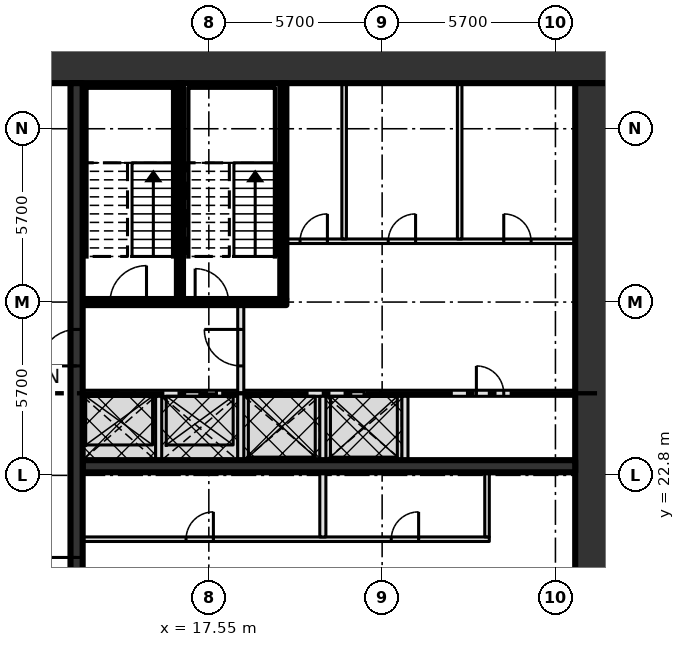
"""IFC4 building model, lengths in metres.
Left out: names, types, materials, properties, quantities, classifications, styles, units other than length and angle.
Written with IfcOpenShell. Run it as: python <this file> out.ifc"""

import sys

from ifc_helpers import new_model, si_unit, direction, frame, frame_2d, origin, place, context, subcontext, project, spatial, rectangle, extrude, element, fill, save


model = new_model("IFC4")
c1 = context("Model", 3, precision=1e-05, world=origin(), true_north=direction((0.0, 1.0)))
c2 = subcontext(c1, "Body", "Model", "MODEL_VIEW")
j1 = project(units=[si_unit("LENGTHUNIT", "METRE"), si_unit("PLANEANGLEUNIT", "RADIAN")], contexts=[c1])
p1 = place(None, origin())
s1 = spatial("IfcSite", under=j1, at=p1, CompositionType="ELEMENT")
p2 = place(p1, origin())
s2 = spatial("IfcBuilding", under=s1, at=p2, CompositionType="ELEMENT")
p3 = place(p2, frame((0.0, 0.0, -9.0)))
s3 = spatial("IfcBuildingStorey", under=s2, at=p3, CompositionType="ELEMENT", Elevation=-9.0)
p4 = place(p3, frame((8.0, 36.3, 0.0), z_axis=(0.0, 0.0, 1.0), x_axis=(1.0, 0.0, 0.0)))
e1 = element("IfcWall", 1, at=p4, inside=s3, PredefinedType="SHEAR", context=c2, shape_type="SweptSolid", body=[
    extrude(rectangle(XDim=22.8, YDim=1.2, at=frame_2d((11.4, 0.0))), origin(), (0.0, 0.0, 1.0), 4.05),
])
p5 = place(p4, frame((2.3, 0.0, 0.0)))
e2 = element("IfcOpeningElement", 2, at=p5, cuts=e1, PredefinedType="OPENING", context=c2, shape_type="SweptSolid", body=[
    extrude(rectangle(XDim=1.8, YDim=2.1, at=frame_2d((0.9, 1.05))), frame((0.0, 0.61, 0.0), z_axis=(0.0, -1.0, 0.0), x_axis=(1.0, 0.0, 0.0)), (0.0, 0.0, 1.0), 1.22),
])
p6 = place(p3, frame((30.2, 15.3, 0.0), z_axis=(0.0, 0.0, 1.0), x_axis=(0.0, 1.0, 0.0)))
e3 = element("IfcWall", 3, at=p6, inside=s3, PredefinedType="SHEAR", context=c2, shape_type="SweptSolid", body=[
    extrude(rectangle(XDim=20.4, YDim=1.2, at=frame_2d((10.2, 0.0))), origin(), (0.0, 0.0, 1.0), 4.05),
])
p7 = place(p3, frame((13.4, 20.7, 0.0), z_axis=(0.0, 0.0, 1.0), x_axis=(1.0, 0.0, 0.0)))
e4 = element("IfcWall", 4, at=p7, inside=s3, PredefinedType="PARTITIONING", context=c2, shape_type="SweptSolid", body=[
    extrude(rectangle(XDim=13.375, YDim=0.15, at=frame_2d((6.688, 0.0))), origin(), (0.0, 0.0, 1.0), 4.05),
])
p8 = place(p7, frame((3.4, 0.0, 0.0)))
e5 = element("IfcOpeningElement", 5, at=p8, cuts=e4, PredefinedType="OPENING", context=c2, shape_type="SweptSolid", body=[
    extrude(rectangle(XDim=0.9, YDim=2.1, at=frame_2d((0.45, 1.05))), frame((0.0, 0.085, 0.0), z_axis=(0.0, -1.0, 0.0), x_axis=(1.0, 0.0, 0.0)), (0.0, 0.0, 1.0), 0.17),
])
p9 = place(p7, frame((10.15, 0.0, 0.0)))
e6 = element("IfcOpeningElement", 6, at=p9, cuts=e4, PredefinedType="OPENING", context=c2, shape_type="SweptSolid", body=[
    extrude(rectangle(XDim=0.9, YDim=2.1, at=frame_2d((0.45, 1.05))), frame((0.0, 0.085, 0.0), z_axis=(0.0, -1.0, 0.0), x_axis=(1.0, 0.0, 0.0)), (0.0, 0.0, 1.0), 0.17),
])
p10 = place(p3, frame((13.4, 23.1, 0.0), z_axis=(0.0, 0.0, 1.0), x_axis=(1.0, 0.0, 0.0)))
e7 = element("IfcWall", 7, at=p10, inside=s3, PredefinedType="SHEAR", context=c2, shape_type="SweptSolid", body=[
    extrude(rectangle(XDim=16.2, YDim=0.4, at=frame_2d((8.1, 0.0))), origin(), (0.0, 0.0, 1.0), 4.05),
])
p11 = place(p3, frame((13.4, 25.5, 0.0), z_axis=(0.0, 0.0, 1.0), x_axis=(1.0, 0.0, 0.0)))
e8 = element("IfcWall", 8, at=p11, inside=s3, PredefinedType="SOLIDWALL", context=c2, shape_type="SweptSolid", body=[
    extrude(rectangle(XDim=16.2, YDim=0.2, at=frame_2d((8.1, 0.0))), origin(), (0.0, 0.0, 1.0), 4.05),
])
p12 = place(p11, frame((0.6, 0.0, 0.0)))
e9 = element("IfcOpeningElement", 9, at=p12, cuts=e8, PredefinedType="OPENING", context=c2, shape_type="SweptSolid", body=[
    extrude(rectangle(XDim=1.1, YDim=2.1, at=frame_2d((0.55, 1.05))), frame((0.0, 0.11, 0.0), z_axis=(0.0, -1.0, 0.0), x_axis=(1.0, 0.0, 0.0)), (0.0, 0.0, 1.0), 0.22),
])
p13 = place(p11, frame((3.3, 0.0, 0.0)))
e10 = element("IfcOpeningElement", 10, at=p13, cuts=e8, PredefinedType="OPENING", context=c2, shape_type="SweptSolid", body=[
    extrude(rectangle(XDim=1.1, YDim=2.1, at=frame_2d((0.55, 1.05))), frame((0.0, 0.11, 0.0), z_axis=(0.0, -1.0, 0.0), x_axis=(1.0, 0.0, 0.0)), (0.0, 0.0, 1.0), 0.22),
])
p14 = place(p11, frame((6.0, 0.0, 0.0)))
e11 = element("IfcOpeningElement", 11, at=p14, cuts=e8, PredefinedType="OPENING", context=c2, shape_type="SweptSolid", body=[
    extrude(rectangle(XDim=1.1, YDim=2.1, at=frame_2d((0.55, 1.05))), frame((0.0, 0.11, 0.0), z_axis=(0.0, -1.0, 0.0), x_axis=(1.0, 0.0, 0.0)), (0.0, 0.0, 1.0), 0.22),
])
p15 = place(p11, frame((8.7, 0.0, 0.0)))
e12 = element("IfcOpeningElement", 12, at=p15, cuts=e8, PredefinedType="OPENING", context=c2, shape_type="SweptSolid", body=[
    extrude(rectangle(XDim=1.1, YDim=2.1, at=frame_2d((0.55, 1.05))), frame((0.0, 0.11, 0.0), z_axis=(0.0, -1.0, 0.0), x_axis=(1.0, 0.0, 0.0)), (0.0, 0.0, 1.0), 0.22),
])
p16 = place(p11, frame((12.95, 0.0, 0.0)))
e13 = element("IfcOpeningElement", 13, at=p16, cuts=e8, PredefinedType="OPENING", context=c2, shape_type="SweptSolid", body=[
    extrude(rectangle(XDim=0.9, YDim=2.1, at=frame_2d((0.45, 1.05))), frame((0.0, 0.11, 0.0), z_axis=(0.0, -1.0, 0.0), x_axis=(1.0, 0.0, 0.0)), (0.0, 0.0, 1.0), 0.22),
])
p17 = place(p3, frame((13.4, 28.5, 0.0), z_axis=(0.0, 0.0, 1.0), x_axis=(1.0, 0.0, 0.0)))
e14 = element("IfcWall", 14, at=p17, inside=s3, PredefinedType="SOLIDWALL", context=c2, shape_type="SweptSolid", body=[
    extrude(rectangle(XDim=6.7, YDim=0.2, at=frame_2d((3.35, 0.0))), origin(), (0.0, 0.0, 1.0), 4.05),
])
p18 = place(p17, frame((0.9, 0.0, 0.0)))
e15 = element("IfcOpeningElement", 15, at=p18, cuts=e14, PredefinedType="OPENING", context=c2, shape_type="SweptSolid", body=[
    extrude(rectangle(XDim=1.2, YDim=2.1, at=frame_2d((0.6, 1.05))), frame((0.0, 0.11, 0.0), z_axis=(0.0, -1.0, 0.0), x_axis=(1.0, 0.0, 0.0)), (0.0, 0.0, 1.0), 0.22),
])
p19 = place(p17, frame((3.7, 0.0, 0.0)))
e16 = element("IfcOpeningElement", 16, at=p19, cuts=e14, PredefinedType="OPENING", context=c2, shape_type="SweptSolid", body=[
    extrude(rectangle(XDim=1.1, YDim=2.1, at=frame_2d((0.55, 1.05))), frame((0.0, 0.11, 0.0), z_axis=(0.0, -1.0, 0.0), x_axis=(1.0, 0.0, 0.0)), (0.0, 0.0, 1.0), 0.22),
])
p20 = place(p3, frame((20.1, 30.5, 0.0), z_axis=(0.0, 0.0, 1.0), x_axis=(1.0, 0.0, 0.0)))
e17 = element("IfcWall", 17, at=p20, inside=s3, PredefinedType="PARTITIONING", context=c2, shape_type="SweptSolid", body=[
    extrude(rectangle(XDim=9.5, YDim=0.15, at=frame_2d((4.75, 0.0))), origin(), (0.0, 0.0, 1.0), 4.05),
])
p21 = place(p20, frame((0.45, 0.0, 0.0)))
e18 = element("IfcOpeningElement", 18, at=p21, cuts=e17, PredefinedType="OPENING", context=c2, shape_type="SweptSolid", body=[
    extrude(rectangle(XDim=0.9, YDim=2.1, at=frame_2d((0.45, 1.05))), frame((0.0, 0.085, 0.0), z_axis=(0.0, -1.0, 0.0), x_axis=(1.0, 0.0, 0.0)), (0.0, 0.0, 1.0), 0.17),
])
p22 = place(p20, frame((3.35, 0.0, 0.0)))
e19 = element("IfcOpeningElement", 19, at=p22, cuts=e17, PredefinedType="OPENING", context=c2, shape_type="SweptSolid", body=[
    extrude(rectangle(XDim=0.9, YDim=2.1, at=frame_2d((0.45, 1.05))), frame((0.0, 0.085, 0.0), z_axis=(0.0, -1.0, 0.0), x_axis=(1.0, 0.0, 0.0)), (0.0, 0.0, 1.0), 0.17),
])
p23 = place(p20, frame((7.15, 0.0, 0.0)))
e20 = element("IfcOpeningElement", 20, at=p23, cuts=e17, PredefinedType="OPENING", context=c2, shape_type="SweptSolid", body=[
    extrude(rectangle(XDim=0.9, YDim=2.1, at=frame_2d((0.45, 1.05))), frame((0.0, 0.085, 0.0), z_axis=(0.0, -1.0, 0.0), x_axis=(1.0, 0.0, 0.0)), (0.0, 0.0, 1.0), 0.17),
])
p24 = place(p3, frame((13.2, 15.3, 0.0), z_axis=(0.0, 0.0, 1.0), x_axis=(0.0, 1.0, 0.0)))
e21 = element("IfcWall", 21, at=p24, inside=s3, PredefinedType="SHEAR", context=c2, shape_type="SweptSolid", body=[
    extrude(rectangle(XDim=20.4, YDim=0.4, at=frame_2d((10.2, 0.0))), origin(), (0.0, 0.0, 1.0), 4.05),
])
p25 = place(p24, frame((3.0, 0.0, 0.0)))
e22 = element("IfcOpeningElement", 22, at=p25, cuts=e21, PredefinedType="OPENING", context=c2, shape_type="SweptSolid", body=[
    extrude(rectangle(XDim=1.8, YDim=2.1, at=frame_2d((0.9, 1.05))), frame((0.0, 0.21, 0.0), z_axis=(0.0, -1.0, 0.0), x_axis=(1.0, 0.0, 0.0)), (0.0, 0.0, 1.0), 0.42),
])
p26 = place(p24, frame((11.1, 0.0, 0.0)))
e23 = element("IfcOpeningElement", 23, at=p26, cuts=e21, PredefinedType="OPENING", context=c2, shape_type="SweptSolid", body=[
    extrude(rectangle(XDim=1.2, YDim=2.1, at=frame_2d((0.6, 1.05))), frame((0.0, 0.21, 0.0), z_axis=(0.0, -1.0, 0.0), x_axis=(1.0, 0.0, 0.0)), (0.0, 0.0, 1.0), 0.42),
])
p27 = place(p3, frame((15.9, 23.3, 0.0), z_axis=(0.0, 0.0, 1.0), x_axis=(0.0, 1.0, 0.0)))
e24 = element("IfcWall", 24, at=p27, inside=s3, PredefinedType="SOLIDWALL", context=c2, shape_type="SweptSolid", body=[
    extrude(rectangle(XDim=2.1, YDim=0.2, at=frame_2d((1.05, 0.0))), origin(), (0.0, 0.0, 1.0), 4.05),
])
p28 = place(p3, frame((16.6, 28.6, 0.0), z_axis=(0.0, 0.0, 1.0), x_axis=(0.0, 1.0, 0.0)))
e25 = element("IfcWall", 25, at=p28, inside=s3, PredefinedType="SOLIDWALL", context=c2, shape_type="SweptSolid", body=[
    extrude(rectangle(XDim=7.1, YDim=0.2, at=frame_2d((3.55, 0.0))), origin(), (0.0, 0.0, 1.0), 4.05),
])
p29 = place(p3, frame((18.6, 23.3, 0.0), z_axis=(0.0, 0.0, 1.0), x_axis=(0.0, 1.0, 0.0)))
e26 = element("IfcWall", 26, at=p29, inside=s3, PredefinedType="SOLIDWALL", context=c2, shape_type="SweptSolid", body=[
    extrude(rectangle(XDim=5.1, YDim=0.2, at=frame_2d((2.55, 0.0))), origin(), (0.0, 0.0, 1.0), 4.05),
])
p30 = place(p29, frame((3.1, 0.0, 0.0)))
e27 = element("IfcOpeningElement", 27, at=p30, cuts=e26, PredefinedType="OPENING", context=c2, shape_type="SweptSolid", body=[
    extrude(rectangle(XDim=1.2, YDim=2.1, at=frame_2d((0.6, 1.05))), frame((0.0, 0.11, 0.0), z_axis=(0.0, -1.0, 0.0), x_axis=(1.0, 0.0, 0.0)), (0.0, 0.0, 1.0), 0.22),
])
p31 = place(p3, frame((20.0, 28.6, 0.0), z_axis=(0.0, 0.0, 1.0), x_axis=(0.0, 1.0, 0.0)))
e28 = element("IfcWall", 28, at=p31, inside=s3, PredefinedType="SOLIDWALL", context=c2, shape_type="SweptSolid", body=[
    extrude(rectangle(XDim=7.1, YDim=0.2, at=frame_2d((3.55, 0.0))), origin(), (0.0, 0.0, 1.0), 4.05),
])
p32 = place(p3, frame((21.3, 20.775, 0.0), z_axis=(0.0, 0.0, 1.0), x_axis=(0.0, 1.0, 0.0)))
e29 = element("IfcWall", 29, at=p32, inside=s3, PredefinedType="SOLIDWALL", context=c2, shape_type="SweptSolid", body=[
    extrude(rectangle(XDim=4.625, YDim=0.2, at=frame_2d((2.312, 0.0))), origin(), (0.0, 0.0, 1.0), 4.05),
])
p33 = place(p3, frame((22.0, 30.575, 0.0), z_axis=(0.0, 0.0, 1.0), x_axis=(0.0, 1.0, 0.0)))
e30 = element("IfcWall", 30, at=p33, inside=s3, PredefinedType="PARTITIONING", context=c2, shape_type="SweptSolid", body=[
    extrude(rectangle(XDim=5.125, YDim=0.15, at=frame_2d((2.562, 0.0))), origin(), (0.0, 0.0, 1.0), 4.05),
])
p34 = place(p3, frame((24.0, 23.3, 0.0), z_axis=(0.0, 0.0, 1.0), x_axis=(0.0, 1.0, 0.0)))
e31 = element("IfcWall", 31, at=p34, inside=s3, PredefinedType="SOLIDWALL", context=c2, shape_type="SweptSolid", body=[
    extrude(rectangle(XDim=2.1, YDim=0.2, at=frame_2d((1.05, 0.0))), origin(), (0.0, 0.0, 1.0), 4.05),
])
p35 = place(p3, frame((25.8, 30.575, 0.0), z_axis=(0.0, 0.0, 1.0), x_axis=(0.0, 1.0, 0.0)))
e32 = element("IfcWall", 32, at=p35, inside=s3, PredefinedType="PARTITIONING", context=c2, shape_type="SweptSolid", body=[
    extrude(rectangle(XDim=5.125, YDim=0.15, at=frame_2d((2.562, 0.0))), origin(), (0.0, 0.0, 1.0), 4.05),
])
p36 = place(p3, frame((26.7, 20.775, 0.0), z_axis=(0.0, 0.0, 1.0), x_axis=(0.0, 1.0, 0.0)))
e33 = element("IfcWall", 33, at=p36, inside=s3, PredefinedType="PARTITIONING", context=c2, shape_type="SweptSolid", body=[
    extrude(rectangle(XDim=2.125, YDim=0.15, at=frame_2d((1.062, 0.0))), origin(), (0.0, 0.0, 1.0), 4.05),
])
p37 = place(p12, origin())
e34 = element("IfcDoor", 34, at=p37, inside=s3, OperationType="SLIDING_TO_LEFT", PredefinedType="DOOR", context=c2, shape_type="SweptSolid", body=[
    extrude(rectangle(XDim=1.1, YDim=2.1, at=frame_2d((0.55, 1.05))), frame((0.0, 0.025, 0.0), z_axis=(0.0, -1.0, 0.0), x_axis=(1.0, 0.0, 0.0)), (0.0, 0.0, 1.0), 0.05),
])
fill(e9, e34)
p38 = place(p13, origin())
e35 = element("IfcDoor", 35, at=p38, inside=s3, OperationType="SLIDING_TO_LEFT", PredefinedType="DOOR", context=c2, shape_type="SweptSolid", body=[
    extrude(rectangle(XDim=1.1, YDim=2.1, at=frame_2d((0.55, 1.05))), frame((0.0, 0.025, 0.0), z_axis=(0.0, -1.0, 0.0), x_axis=(1.0, 0.0, 0.0)), (0.0, 0.0, 1.0), 0.05),
])
fill(e10, e35)
p39 = place(p14, origin())
e36 = element("IfcDoor", 36, at=p39, inside=s3, OperationType="SLIDING_TO_LEFT", PredefinedType="DOOR", context=c2, shape_type="SweptSolid", body=[
    extrude(rectangle(XDim=1.1, YDim=2.1, at=frame_2d((0.55, 1.05))), frame((0.0, 0.025, 0.0), z_axis=(0.0, -1.0, 0.0), x_axis=(1.0, 0.0, 0.0)), (0.0, 0.0, 1.0), 0.05),
])
fill(e11, e36)
p40 = place(p15, origin())
e37 = element("IfcDoor", 37, at=p40, inside=s3, OperationType="SLIDING_TO_LEFT", PredefinedType="DOOR", context=c2, shape_type="SweptSolid", body=[
    extrude(rectangle(XDim=1.1, YDim=2.1, at=frame_2d((0.55, 1.05))), frame((0.0, 0.025, 0.0), z_axis=(0.0, -1.0, 0.0), x_axis=(1.0, 0.0, 0.0)), (0.0, 0.0, 1.0), 0.05),
])
fill(e12, e37)
p41 = place(p8, origin())
e38 = element("IfcDoor", 38, at=p41, inside=s3, OperationType="SINGLE_SWING_RIGHT", PredefinedType="DOOR", context=c2, shape_type="SweptSolid", body=[
    extrude(rectangle(XDim=0.9, YDim=2.1, at=frame_2d((0.45, 1.05))), frame((0.0, 0.025, 0.0), z_axis=(0.0, -1.0, 0.0), x_axis=(1.0, 0.0, 0.0)), (0.0, 0.0, 1.0), 0.05),
])
fill(e5, e38)
p42 = place(p9, origin())
e39 = element("IfcDoor", 39, at=p42, inside=s3, OperationType="SINGLE_SWING_RIGHT", PredefinedType="DOOR", context=c2, shape_type="SweptSolid", body=[
    extrude(rectangle(XDim=0.9, YDim=2.1, at=frame_2d((0.45, 1.05))), frame((0.0, 0.025, 0.0), z_axis=(0.0, -1.0, 0.0), x_axis=(1.0, 0.0, 0.0)), (0.0, 0.0, 1.0), 0.05),
])
fill(e6, e39)
p43 = place(p16, origin())
e40 = element("IfcDoor", 40, at=p43, inside=s3, OperationType="SINGLE_SWING_LEFT", PredefinedType="DOOR", context=c2, shape_type="SweptSolid", body=[
    extrude(rectangle(XDim=0.9, YDim=2.1, at=frame_2d((0.45, 1.05))), frame((0.0, 0.025, 0.0), z_axis=(0.0, -1.0, 0.0), x_axis=(1.0, 0.0, 0.0)), (0.0, 0.0, 1.0), 0.05),
])
fill(e13, e40)
p44 = place(p21, origin())
e41 = element("IfcDoor", 41, at=p44, inside=s3, OperationType="SINGLE_SWING_RIGHT", PredefinedType="DOOR", context=c2, shape_type="SweptSolid", body=[
    extrude(rectangle(XDim=0.9, YDim=2.1, at=frame_2d((0.45, 1.05))), frame((0.0, 0.025, 0.0), z_axis=(0.0, -1.0, 0.0), x_axis=(1.0, 0.0, 0.0)), (0.0, 0.0, 1.0), 0.05),
])
fill(e18, e41)
p45 = place(p22, origin())
e42 = element("IfcDoor", 42, at=p45, inside=s3, OperationType="SINGLE_SWING_RIGHT", PredefinedType="DOOR", context=c2, shape_type="SweptSolid", body=[
    extrude(rectangle(XDim=0.9, YDim=2.1, at=frame_2d((0.45, 1.05))), frame((0.0, 0.025, 0.0), z_axis=(0.0, -1.0, 0.0), x_axis=(1.0, 0.0, 0.0)), (0.0, 0.0, 1.0), 0.05),
])
fill(e19, e42)
p46 = place(p23, origin())
e43 = element("IfcDoor", 43, at=p46, inside=s3, OperationType="SINGLE_SWING_LEFT", PredefinedType="DOOR", context=c2, shape_type="SweptSolid", body=[
    extrude(rectangle(XDim=0.9, YDim=2.1, at=frame_2d((0.45, 1.05))), frame((0.0, 0.025, 0.0), z_axis=(0.0, -1.0, 0.0), x_axis=(1.0, 0.0, 0.0)), (0.0, 0.0, 1.0), 0.05),
])
fill(e20, e43)
p47 = place(p18, origin())
e44 = element("IfcDoor", 44, at=p47, inside=s3, OperationType="SINGLE_SWING_RIGHT", PredefinedType="DOOR", context=c2, shape_type="SweptSolid", body=[
    extrude(rectangle(XDim=1.2, YDim=2.1, at=frame_2d((0.6, 1.05))), frame((0.0, 0.025, 0.0), z_axis=(0.0, -1.0, 0.0), x_axis=(1.0, 0.0, 0.0)), (0.0, 0.0, 1.0), 0.05),
])
fill(e15, e44)
p48 = place(p19, origin())
e45 = element("IfcDoor", 45, at=p48, inside=s3, OperationType="SINGLE_SWING_LEFT", PredefinedType="DOOR", context=c2, shape_type="SweptSolid", body=[
    extrude(rectangle(XDim=1.1, YDim=2.1, at=frame_2d((0.55, 1.05))), frame((0.0, 0.025, 0.0), z_axis=(0.0, -1.0, 0.0), x_axis=(1.0, 0.0, 0.0)), (0.0, 0.0, 1.0), 0.05),
])
fill(e16, e45)
p49 = place(p25, origin())
e46 = element("IfcDoor", 46, at=p49, inside=s3, OperationType="DOUBLE_DOOR_SINGLE_SWING", PredefinedType="DOOR", context=c2, shape_type="SweptSolid", body=[
    extrude(rectangle(XDim=1.8, YDim=2.1, at=frame_2d((0.9, 1.05))), frame((0.0, 0.025, 0.0), z_axis=(0.0, -1.0, 0.0), x_axis=(1.0, 0.0, 0.0)), (0.0, 0.0, 1.0), 0.05),
])
fill(e22, e46)
p50 = place(p26, origin())
e47 = element("IfcDoor", 47, at=p50, inside=s3, OperationType="SINGLE_SWING_LEFT", PredefinedType="DOOR", context=c2, shape_type="SweptSolid", body=[
    extrude(rectangle(XDim=1.2, YDim=2.1, at=frame_2d((0.6, 1.05))), frame((0.0, 0.025, 0.0), z_axis=(0.0, -1.0, 0.0), x_axis=(1.0, 0.0, 0.0)), (0.0, 0.0, 1.0), 0.05),
])
fill(e23, e47)
p51 = place(p30, origin())
e48 = element("IfcDoor", 48, at=p51, inside=s3, OperationType="SINGLE_SWING_RIGHT", PredefinedType="DOOR", context=c2, shape_type="SweptSolid", body=[
    extrude(rectangle(XDim=1.2, YDim=2.1, at=frame_2d((0.6, 1.05))), frame((0.0, 0.025, 0.0), z_axis=(0.0, -1.0, 0.0), x_axis=(1.0, 0.0, 0.0)), (0.0, 0.0, 1.0), 0.05),
])
fill(e27, e48)
save(model, sys.argv[1])
